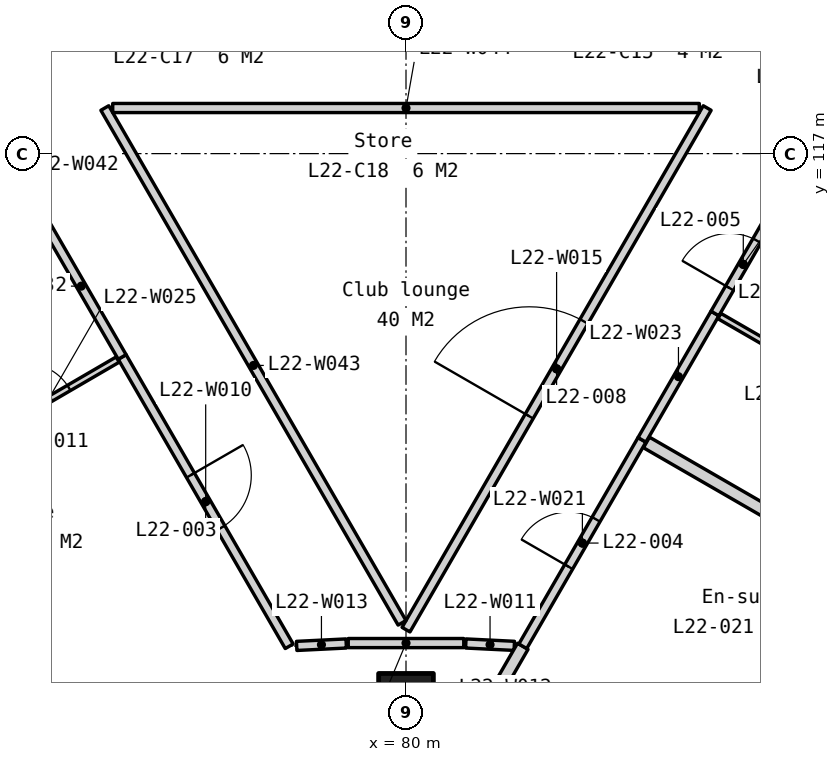
"""IFC4 building model, lengths in metres.
Left out: names, types, materials, properties, quantities, classifications, styles, units other than length and angle.
Written with IfcOpenShell. Run it as: python <this file> out.ifc"""

import sys

from ifc_helpers import new_model, si_unit, direction, frame, frame_2d, origin, origin_2d, place, context, subcontext, project, spatial, polyline, rectangle, outline, extrude, element, fill, save


model = new_model("IFC4")
c1 = context("Model", 3, precision=1e-05, world=origin(), true_north=direction((0.0, 1.0)))
c2 = subcontext(c1, "Body", "Model", "MODEL_VIEW")
j1 = project(units=[si_unit("LENGTHUNIT", "METRE"), si_unit("PLANEANGLEUNIT", "RADIAN")], contexts=[c1])
p1 = place(None, origin())
s1 = spatial("IfcSite", under=j1, at=p1, CompositionType="ELEMENT")
p2 = place(p1, origin())
s2 = spatial("IfcBuilding", under=s1, at=p2, CompositionType="ELEMENT")
p3 = place(p2, frame((0.0, 0.0, 92.3)))
s3 = spatial("IfcBuildingStorey", under=s2, at=p3, CompositionType="ELEMENT", Elevation=92.3)
p4 = place(p3, frame((80.0, 108.0, 0.0), z_axis=(0.0, 0.0, 1.0), x_axis=(1.0, 0.0, 0.0)))
e1 = element("IfcColumn", 1, at=p4, inside=s3, PredefinedType="COLUMN", context=c2, shape_type="SweptSolid", body=[
    extrude(rectangle(XDim=0.9, YDim=0.9, at=origin_2d()), origin(), (0.0, 0.0, 1.0), 3.5),
])
p5 = place(p3, frame((56.073, 130.263, -0.15), z_axis=(0.0, 0.0, 1.0), x_axis=(0.500000478905, -0.866025127289, 0.0)))
e2 = element("IfcWall", 2, at=p5, inside=s3, PredefinedType="SOLIDWALL", context=c2, shape_type="SweptSolid", body=[
    extrude(outline(polyline([(42.643, 0.0), (42.643, 3.5), (0.0, 3.5), (0.0, 0.0), (42.643, 0.0)])), frame((0.0, 0.225, 0.0), z_axis=(0.0, -1.0, 0.0), x_axis=(1.0, 0.0, 0.0)), (0.0, 0.0, 1.0), 0.45),
])
p6 = place(p5, frame((2.814, 0.0, 1.05)))
e3 = element("IfcOpeningElement", 3, at=p6, cuts=e2, PredefinedType="OPENING", context=c2, shape_type="SweptSolid", body=[
    extrude(rectangle(XDim=1.2, YDim=1.5, at=frame_2d((0.6, 0.75))), frame((0.0, 0.235, 0.0), z_axis=(0.0, -1.0, 0.0), x_axis=(1.0, 0.0, 0.0)), (0.0, 0.0, 1.0), 0.47),
])
p7 = place(p5, frame((4.514, 0.0, 1.05)))
e4 = element("IfcOpeningElement", 4, at=p7, cuts=e2, PredefinedType="OPENING", context=c2, shape_type="SweptSolid", body=[
    extrude(rectangle(XDim=1.2, YDim=1.5, at=frame_2d((0.6, 0.75))), frame((0.0, 0.235, 0.0), z_axis=(0.0, -1.0, 0.0), x_axis=(1.0, 0.0, 0.0)), (0.0, 0.0, 1.0), 0.47),
])
p8 = place(p5, frame((11.343, 0.0, 1.05)))
e5 = element("IfcOpeningElement", 5, at=p8, cuts=e2, PredefinedType="OPENING", context=c2, shape_type="SweptSolid", body=[
    extrude(rectangle(XDim=1.2, YDim=1.5, at=frame_2d((0.6, 0.75))), frame((0.0, 0.235, 0.0), z_axis=(0.0, -1.0, 0.0), x_axis=(1.0, 0.0, 0.0)), (0.0, 0.0, 1.0), 0.47),
])
p9 = place(p5, frame((13.043, 0.0, 1.05)))
e6 = element("IfcOpeningElement", 6, at=p9, cuts=e2, PredefinedType="OPENING", context=c2, shape_type="SweptSolid", body=[
    extrude(rectangle(XDim=1.2, YDim=1.5, at=frame_2d((0.6, 0.75))), frame((0.0, 0.235, 0.0), z_axis=(0.0, -1.0, 0.0), x_axis=(1.0, 0.0, 0.0)), (0.0, 0.0, 1.0), 0.47),
])
p10 = place(p5, frame((19.872, 0.0, 1.05)))
e7 = element("IfcOpeningElement", 7, at=p10, cuts=e2, PredefinedType="OPENING", context=c2, shape_type="SweptSolid", body=[
    extrude(rectangle(XDim=1.2, YDim=1.5, at=frame_2d((0.6, 0.75))), frame((0.0, 0.235, 0.0), z_axis=(0.0, -1.0, 0.0), x_axis=(1.0, 0.0, 0.0)), (0.0, 0.0, 1.0), 0.47),
])
p11 = place(p5, frame((21.572, 0.0, 1.05)))
e8 = element("IfcOpeningElement", 8, at=p11, cuts=e2, PredefinedType="OPENING", context=c2, shape_type="SweptSolid", body=[
    extrude(rectangle(XDim=1.2, YDim=1.5, at=frame_2d((0.6, 0.75))), frame((0.0, 0.235, 0.0), z_axis=(0.0, -1.0, 0.0), x_axis=(1.0, 0.0, 0.0)), (0.0, 0.0, 1.0), 0.47),
])
p12 = place(p5, frame((28.4, 0.0, 1.05)))
e9 = element("IfcOpeningElement", 9, at=p12, cuts=e2, PredefinedType="OPENING", context=c2, shape_type="SweptSolid", body=[
    extrude(rectangle(XDim=1.2, YDim=1.5, at=frame_2d((0.6, 0.75))), frame((0.0, 0.235, 0.0), z_axis=(0.0, -1.0, 0.0), x_axis=(1.0, 0.0, 0.0)), (0.0, 0.0, 1.0), 0.47),
])
p13 = place(p5, frame((30.1, 0.0, 1.05)))
e10 = element("IfcOpeningElement", 10, at=p13, cuts=e2, PredefinedType="OPENING", context=c2, shape_type="SweptSolid", body=[
    extrude(rectangle(XDim=1.2, YDim=1.5, at=frame_2d((0.6, 0.75))), frame((0.0, 0.235, 0.0), z_axis=(0.0, -1.0, 0.0), x_axis=(1.0, 0.0, 0.0)), (0.0, 0.0, 1.0), 0.47),
])
p14 = place(p5, frame((36.929, 0.0, 1.05)))
e11 = element("IfcOpeningElement", 11, at=p14, cuts=e2, PredefinedType="OPENING", context=c2, shape_type="SweptSolid", body=[
    extrude(rectangle(XDim=1.2, YDim=1.5, at=frame_2d((0.6, 0.75))), frame((0.0, 0.235, 0.0), z_axis=(0.0, -1.0, 0.0), x_axis=(1.0, 0.0, 0.0)), (0.0, 0.0, 1.0), 0.47),
])
p15 = place(p5, frame((38.629, 0.0, 1.05)))
e12 = element("IfcOpeningElement", 12, at=p15, cuts=e2, PredefinedType="OPENING", context=c2, shape_type="SweptSolid", body=[
    extrude(rectangle(XDim=1.2, YDim=1.5, at=frame_2d((0.6, 0.75))), frame((0.0, 0.235, 0.0), z_axis=(0.0, -1.0, 0.0), x_axis=(1.0, 0.0, 0.0)), (0.0, 0.0, 1.0), 0.47),
])
p16 = place(p3, frame((82.605, 93.333, -0.15), z_axis=(0.0, 0.0, 1.0), x_axis=(0.500000478905, 0.866025127289, 0.0)))
e13 = element("IfcWall", 13, at=p16, inside=s3, PredefinedType="SOLIDWALL", context=c2, shape_type="SweptSolid", body=[
    extrude(outline(polyline([(42.643, 0.0), (42.643, 3.5), (0.0, 3.5), (0.0, 0.0), (42.643, 0.0)])), frame((0.0, 0.225, 0.0), z_axis=(0.0, -1.0, 0.0), x_axis=(1.0, 0.0, 0.0)), (0.0, 0.0, 1.0), 0.45),
])
p17 = place(p16, frame((2.814, 0.0, 1.05)))
e14 = element("IfcOpeningElement", 14, at=p17, cuts=e13, PredefinedType="OPENING", context=c2, shape_type="SweptSolid", body=[
    extrude(rectangle(XDim=1.2, YDim=1.5, at=frame_2d((0.6, 0.75))), frame((0.0, 0.235, 0.0), z_axis=(0.0, -1.0, 0.0), x_axis=(1.0, 0.0, 0.0)), (0.0, 0.0, 1.0), 0.47),
])
p18 = place(p16, frame((4.514, 0.0, 1.05)))
e15 = element("IfcOpeningElement", 15, at=p18, cuts=e13, PredefinedType="OPENING", context=c2, shape_type="SweptSolid", body=[
    extrude(rectangle(XDim=1.2, YDim=1.5, at=frame_2d((0.6, 0.75))), frame((0.0, 0.235, 0.0), z_axis=(0.0, -1.0, 0.0), x_axis=(1.0, 0.0, 0.0)), (0.0, 0.0, 1.0), 0.47),
])
p19 = place(p16, frame((11.343, 0.0, 1.05)))
e16 = element("IfcOpeningElement", 16, at=p19, cuts=e13, PredefinedType="OPENING", context=c2, shape_type="SweptSolid", body=[
    extrude(rectangle(XDim=1.2, YDim=1.5, at=frame_2d((0.6, 0.75))), frame((0.0, 0.235, 0.0), z_axis=(0.0, -1.0, 0.0), x_axis=(1.0, 0.0, 0.0)), (0.0, 0.0, 1.0), 0.47),
])
p20 = place(p16, frame((13.043, 0.0, 1.05)))
e17 = element("IfcOpeningElement", 17, at=p20, cuts=e13, PredefinedType="OPENING", context=c2, shape_type="SweptSolid", body=[
    extrude(rectangle(XDim=1.2, YDim=1.5, at=frame_2d((0.6, 0.75))), frame((0.0, 0.235, 0.0), z_axis=(0.0, -1.0, 0.0), x_axis=(1.0, 0.0, 0.0)), (0.0, 0.0, 1.0), 0.47),
])
p21 = place(p16, frame((19.872, 0.0, 1.05)))
e18 = element("IfcOpeningElement", 18, at=p21, cuts=e13, PredefinedType="OPENING", context=c2, shape_type="SweptSolid", body=[
    extrude(rectangle(XDim=1.2, YDim=1.5, at=frame_2d((0.6, 0.75))), frame((0.0, 0.235, 0.0), z_axis=(0.0, -1.0, 0.0), x_axis=(1.0, 0.0, 0.0)), (0.0, 0.0, 1.0), 0.47),
])
p22 = place(p16, frame((21.572, 0.0, 1.05)))
e19 = element("IfcOpeningElement", 19, at=p22, cuts=e13, PredefinedType="OPENING", context=c2, shape_type="SweptSolid", body=[
    extrude(rectangle(XDim=1.2, YDim=1.5, at=frame_2d((0.6, 0.75))), frame((0.0, 0.235, 0.0), z_axis=(0.0, -1.0, 0.0), x_axis=(1.0, 0.0, 0.0)), (0.0, 0.0, 1.0), 0.47),
])
p23 = place(p16, frame((28.4, 0.0, 1.05)))
e20 = element("IfcOpeningElement", 20, at=p23, cuts=e13, PredefinedType="OPENING", context=c2, shape_type="SweptSolid", body=[
    extrude(rectangle(XDim=1.2, YDim=1.5, at=frame_2d((0.6, 0.75))), frame((0.0, 0.235, 0.0), z_axis=(0.0, -1.0, 0.0), x_axis=(1.0, 0.0, 0.0)), (0.0, 0.0, 1.0), 0.47),
])
p24 = place(p16, frame((30.1, 0.0, 1.05)))
e21 = element("IfcOpeningElement", 21, at=p24, cuts=e13, PredefinedType="OPENING", context=c2, shape_type="SweptSolid", body=[
    extrude(rectangle(XDim=1.2, YDim=1.5, at=frame_2d((0.6, 0.75))), frame((0.0, 0.235, 0.0), z_axis=(0.0, -1.0, 0.0), x_axis=(1.0, 0.0, 0.0)), (0.0, 0.0, 1.0), 0.47),
])
p25 = place(p16, frame((36.929, 0.0, 1.05)))
e22 = element("IfcOpeningElement", 22, at=p25, cuts=e13, PredefinedType="OPENING", context=c2, shape_type="SweptSolid", body=[
    extrude(rectangle(XDim=1.2, YDim=1.5, at=frame_2d((0.6, 0.75))), frame((0.0, 0.235, 0.0), z_axis=(0.0, -1.0, 0.0), x_axis=(1.0, 0.0, 0.0)), (0.0, 0.0, 1.0), 0.47),
])
p26 = place(p16, frame((38.629, 0.0, 1.05)))
e23 = element("IfcOpeningElement", 23, at=p26, cuts=e13, PredefinedType="OPENING", context=c2, shape_type="SweptSolid", body=[
    extrude(rectangle(XDim=1.2, YDim=1.5, at=frame_2d((0.6, 0.75))), frame((0.0, 0.235, 0.0), z_axis=(0.0, -1.0, 0.0), x_axis=(1.0, 0.0, 0.0)), (0.0, 0.0, 1.0), 0.47),
])
p27 = place(p3, frame((83.954, 112.25, 0.0), z_axis=(0.0, 0.0, 1.0), x_axis=(0.866030828432, -0.499990604118, 0.0)))
e24 = element("IfcWall", 24, at=p27, inside=s3, PredefinedType="PARTITIONING", context=c2, shape_type="SweptSolid", body=[
    extrude(rectangle(XDim=8.065, YDim=0.2, at=frame_2d((4.033, 0.0))), origin(), (0.0, 0.0, 1.0), 3.35),
])
p28 = place(p3, frame((75.332, 113.656, 0.0), z_axis=(0.0, 0.0, 1.0), x_axis=(0.499995531332, -0.866027983755, 0.0)))
e25 = element("IfcWall", 25, at=p28, inside=s3, PredefinedType="PARTITIONING", context=c2, shape_type="SweptSolid", body=[
    extrude(rectangle(XDim=5.495, YDim=0.15, at=frame_2d((2.747, 0.0))), origin(), (0.0, 0.0, 1.0), 3.35),
])
p29 = place(p28, frame((2.247, 0.0, 0.0)))
e26 = element("IfcOpeningElement", 26, at=p29, cuts=e25, PredefinedType="OPENING", context=c2, shape_type="SweptSolid", body=[
    extrude(rectangle(XDim=1.0, YDim=2.1, at=frame_2d((0.5, 1.05))), frame((0.0, 0.085, 0.0), z_axis=(0.0, -1.0, 0.0), x_axis=(1.0, 0.0, 0.0)), (0.0, 0.0, 1.0), 0.17),
])
p30 = place(p3, frame((80.983, 108.943, 0.0), z_axis=(0.0, 0.0, 1.0), x_axis=(0.998802165703, -0.048930908301, 0.0)))
e27 = element("IfcWall", 27, at=p30, inside=s3, PredefinedType="PARTITIONING", context=c2, shape_type="SweptSolid", body=[
    extrude(rectangle(XDim=0.798, YDim=0.15, at=frame_2d((0.399, 0.0))), origin(), (0.0, 0.0, 1.0), 3.35),
])
p31 = place(p3, frame((80.816, 106.985, 0.0), z_axis=(0.0, 0.0, 1.0), x_axis=(0.500003149848, 0.866023585211, 0.0)))
e28 = element("IfcWall", 28, at=p31, inside=s3, PredefinedType="PARTITIONING", context=c2, shape_type="SweptSolid", body=[
    extrude(rectangle(XDim=2.208, YDim=0.2, at=frame_2d((1.104, 0.0))), origin(), (0.0, 0.0, 1.0), 3.35),
])
p32 = place(p3, frame((78.202, 108.903, 0.0), z_axis=(0.0, 0.0, 1.0), x_axis=(0.998794521593, 0.049086695098, 0.0)))
e29 = element("IfcWall", 29, at=p32, inside=s3, PredefinedType="PARTITIONING", context=c2, shape_type="SweptSolid", body=[
    extrude(rectangle(XDim=0.816, YDim=0.15, at=frame_2d((0.408, 0.0))), origin(), (0.0, 0.0, 1.0), 3.35),
])
p33 = place(p3, frame((79.05, 108.95, 0.0), z_axis=(0.0, 0.0, 1.0), x_axis=(1.0, 0.0, 0.0)))
e30 = element("IfcWall", 30, at=p33, inside=s3, PredefinedType="PARTITIONING", context=c2, shape_type="SweptSolid", body=[
    extrude(rectangle(XDim=1.9, YDim=0.15, at=frame_2d((0.95, 0.0))), origin(), (0.0, 0.0, 1.0), 3.35),
])
p34 = place(p3, frame((80.0, 109.17, 0.0), z_axis=(0.0, 0.0, 1.0), x_axis=(0.499995505729, 0.866027998537, 0.0)))
e31 = element("IfcWall", 31, at=p34, inside=s3, PredefinedType="PARTITIONING", context=c2, shape_type="SweptSolid", body=[
    extrude(rectangle(XDim=9.907, YDim=0.15, at=frame_2d((4.953, 0.0))), origin(), (0.0, 0.0, 1.0), 3.35),
])
p35 = place(p34, frame((4.053, 0.0, 0.0)))
e32 = element("IfcOpeningElement", 32, at=p35, cuts=e31, PredefinedType="OPENING", context=c2, shape_type="SweptSolid", body=[
    extrude(rectangle(XDim=1.8, YDim=2.1, at=frame_2d((0.9, 1.05))), frame((0.0, 0.085, 0.0), z_axis=(0.0, -1.0, 0.0), x_axis=(1.0, 0.0, 0.0)), (0.0, 0.0, 1.0), 0.17),
])
p36 = place(p3, frame((81.921, 108.897, 0.0), z_axis=(0.0, 0.0, 1.0), x_axis=(0.500017148795, 0.866015502696, 0.0)))
e33 = element("IfcWall", 33, at=p36, inside=s3, PredefinedType="PARTITIONING", context=c2, shape_type="SweptSolid", body=[
    extrude(rectangle(XDim=3.92, YDim=0.15, at=frame_2d((1.96, 0.0))), origin(), (0.0, 0.0, 1.0), 3.35),
])
p37 = place(p36, frame((1.51, 0.0, 0.0)))
e34 = element("IfcOpeningElement", 34, at=p37, cuts=e33, PredefinedType="OPENING", context=c2, shape_type="SweptSolid", body=[
    extrude(rectangle(XDim=0.9, YDim=2.1, at=frame_2d((0.45, 1.05))), frame((0.0, 0.085, 0.0), z_axis=(0.0, -1.0, 0.0), x_axis=(1.0, 0.0, 0.0)), (0.0, 0.0, 1.0), 0.17),
])
p38 = place(p3, frame((83.881, 112.292, 0.0), z_axis=(0.0, 0.0, 1.0), x_axis=(0.500001309137, 0.866024647952, 0.0)))
e35 = element("IfcWall", 35, at=p38, inside=s3, PredefinedType="PARTITIONING", context=c2, shape_type="SweptSolid", body=[
    extrude(rectangle(XDim=2.4, YDim=0.15, at=frame_2d((1.2, 0.0))), origin(), (0.0, 0.0, 1.0), 3.35),
])
p39 = place(p3, frame((72.964, 112.277, 0.0), z_axis=(0.0, 0.0, 1.0), x_axis=(0.864225488694, 0.503104665742, 0.0)))
e36 = element("IfcWall", 36, at=p39, inside=s3, PredefinedType="PARTITIONING", context=c2, shape_type="SweptSolid", body=[
    extrude(rectangle(XDim=2.655, YDim=0.1, at=frame_2d((1.327, 0.0))), origin(), (0.0, 0.0, 1.0), 3.35),
])
p40 = place(p39, frame((0.927, 0.0, 0.0)))
e37 = element("IfcOpeningElement", 37, at=p40, cuts=e36, PredefinedType="OPENING", context=c2, shape_type="SweptSolid", body=[
    extrude(rectangle(XDim=0.8, YDim=2.1, at=frame_2d((0.4, 1.05))), frame((0.0, 0.06, 0.0), z_axis=(0.0, -1.0, 0.0), x_axis=(1.0, 0.0, 0.0)), (0.0, 0.0, 1.0), 0.12),
])
p41 = place(p3, frame((85.154, 114.328, 0.0), z_axis=(0.0, 0.0, 1.0), x_axis=(0.866040446274, -0.499973944738, 0.0)))
e38 = element("IfcWall", 38, at=p41, inside=s3, PredefinedType="PARTITIONING", context=c2, shape_type="SweptSolid", body=[
    extrude(rectangle(XDim=2.465, YDim=0.1, at=frame_2d((1.232, 0.0))), origin(), (0.0, 0.0, 1.0), 3.35),
])
p42 = place(p41, frame((0.833, 0.0, 0.0)))
e39 = element("IfcOpeningElement", 39, at=p42, cuts=e38, PredefinedType="OPENING", context=c2, shape_type="SweptSolid", body=[
    extrude(rectangle(XDim=0.8, YDim=2.1, at=frame_2d((0.4, 1.05))), frame((0.0, 0.06, 0.0), z_axis=(0.0, -1.0, 0.0), x_axis=(1.0, 0.0, 0.0)), (0.0, 0.0, 1.0), 0.12),
])
p43 = place(p3, frame((73.987, 115.985, 0.0), z_axis=(0.0, 0.0, 1.0), x_axis=(0.499994808408, -0.866028401131, 0.0)))
e40 = element("IfcWall", 40, at=p43, inside=s3, PredefinedType="PARTITIONING", context=c2, shape_type="SweptSolid", body=[
    extrude(rectangle(XDim=2.69, YDim=0.15, at=frame_2d((1.345, 0.0))), origin(), (0.0, 0.0, 1.0), 3.35),
])
p44 = place(p3, frame((85.081, 114.371, 0.0), z_axis=(0.0, 0.0, 1.0), x_axis=(0.499941596792, 0.866059120267, 0.0)))
e41 = element("IfcWall", 41, at=p44, inside=s3, PredefinedType="PARTITIONING", context=c2, shape_type="SweptSolid", body=[
    extrude(rectangle(XDim=1.865, YDim=0.15, at=frame_2d((0.932, 0.0))), origin(), (0.0, 0.0, 1.0), 3.35),
])
p45 = place(p44, frame((0.482, 0.0, 0.0)))
e42 = element("IfcOpeningElement", 42, at=p45, cuts=e41, PredefinedType="OPENING", context=c2, shape_type="SweptSolid", body=[
    extrude(rectangle(XDim=0.9, YDim=2.1, at=frame_2d((0.45, 1.05))), frame((0.0, 0.085, 0.0), z_axis=(0.0, -1.0, 0.0), x_axis=(1.0, 0.0, 0.0)), (0.0, 0.0, 1.0), 0.17),
])
p46 = place(p3, frame((75.047, 117.75, 0.0), z_axis=(0.0, 0.0, 1.0), x_axis=(0.49999841397, -0.866026319477, 0.0)))
e43 = element("IfcWall", 43, at=p46, inside=s3, PredefinedType="PARTITIONING", context=c2, shape_type="SweptSolid", body=[
    extrude(rectangle(XDim=9.777, YDim=0.15, at=frame_2d((4.888, 0.0))), origin(), (0.0, 0.0, 1.0), 3.35),
])
p47 = place(p3, frame((75.177, 117.75, 0.0), z_axis=(0.0, 0.0, 1.0), x_axis=(1.0, 0.0, 0.0)))
e44 = element("IfcWall", 44, at=p47, inside=s3, PredefinedType="PARTITIONING", context=c2, shape_type="SweptSolid", body=[
    extrude(rectangle(XDim=9.647, YDim=0.15, at=frame_2d((4.823, 0.0))), origin(), (0.0, 0.0, 1.0), 3.35),
])
p48 = place(p29, origin())
e45 = element("IfcDoor", 45, at=p48, inside=s3, OperationType="SINGLE_SWING_LEFT", PredefinedType="DOOR", context=c2, shape_type="SweptSolid", body=[
    extrude(rectangle(XDim=1.0, YDim=2.1, at=frame_2d((0.5, 1.05))), frame((0.0, 0.025, 0.0), z_axis=(0.0, -1.0, 0.0), x_axis=(1.0, 0.0, 0.0)), (0.0, 0.0, 1.0), 0.05),
])
fill(e26, e45)
p49 = place(p37, origin())
e46 = element("IfcDoor", 46, at=p49, inside=s3, OperationType="SINGLE_SWING_LEFT", PredefinedType="DOOR", context=c2, shape_type="SweptSolid", body=[
    extrude(rectangle(XDim=0.9, YDim=2.1, at=frame_2d((0.45, 1.05))), frame((0.0, 0.025, 0.0), z_axis=(0.0, -1.0, 0.0), x_axis=(1.0, 0.0, 0.0)), (0.0, 0.0, 1.0), 0.05),
])
fill(e34, e46)
p50 = place(p45, origin())
e47 = element("IfcDoor", 47, at=p50, inside=s3, OperationType="SINGLE_SWING_LEFT", PredefinedType="DOOR", context=c2, shape_type="SweptSolid", body=[
    extrude(rectangle(XDim=0.9, YDim=2.1, at=frame_2d((0.45, 1.05))), frame((0.0, 0.025, 0.0), z_axis=(0.0, -1.0, 0.0), x_axis=(1.0, 0.0, 0.0)), (0.0, 0.0, 1.0), 0.05),
])
fill(e42, e47)
p51 = place(p35, origin())
e48 = element("IfcDoor", 48, at=p51, inside=s3, OperationType="SINGLE_SWING_LEFT", PredefinedType="DOOR", context=c2, shape_type="SweptSolid", body=[
    extrude(rectangle(XDim=1.8, YDim=2.1, at=frame_2d((0.9, 1.05))), frame((0.0, 0.025, 0.0), z_axis=(0.0, -1.0, 0.0), x_axis=(1.0, 0.0, 0.0)), (0.0, 0.0, 1.0), 0.05),
])
fill(e32, e48)
p52 = place(p40, origin())
e49 = element("IfcDoor", 49, at=p52, inside=s3, OperationType="SINGLE_SWING_LEFT", PredefinedType="DOOR", context=c2, shape_type="SweptSolid", body=[
    extrude(rectangle(XDim=0.8, YDim=2.1, at=frame_2d((0.4, 1.05))), frame((0.0, 0.025, 0.0), z_axis=(0.0, -1.0, 0.0), x_axis=(1.0, 0.0, 0.0)), (0.0, 0.0, 1.0), 0.05),
])
fill(e37, e49)
save(model, sys.argv[1])
